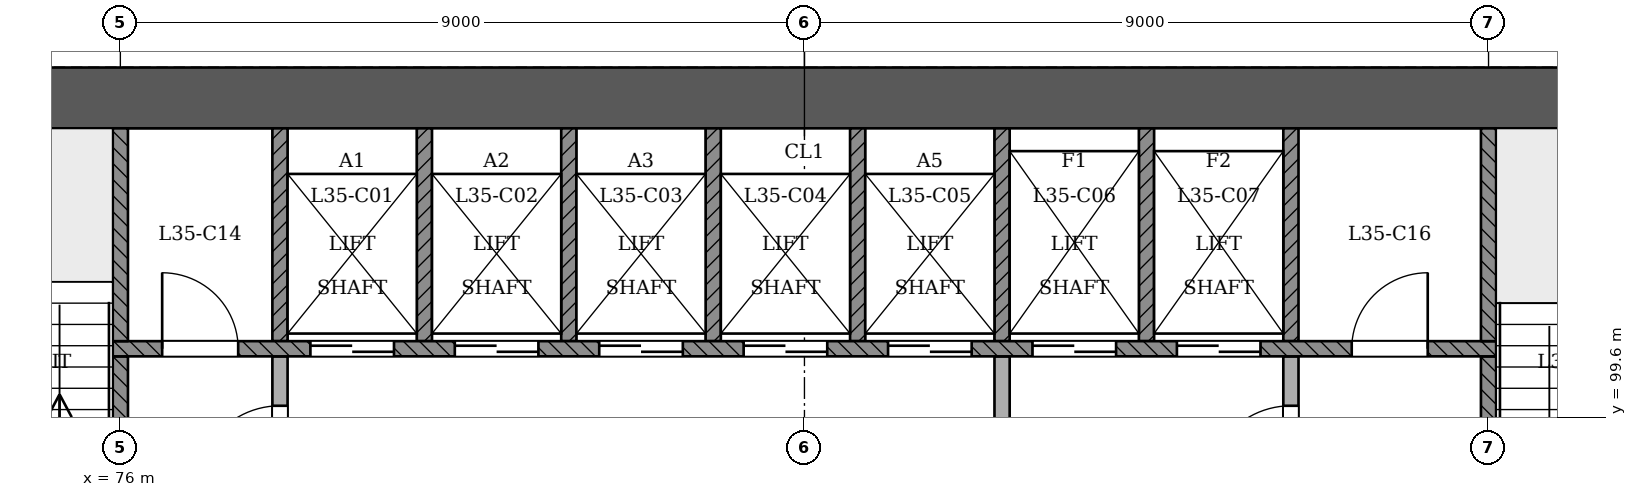
"""IFC4 building model, lengths in metres.
Left out: names, types, materials, properties, quantities, classifications, styles, units other than length and angle.
Written with IfcOpenShell. Run it as: python <this file> out.ifc"""

import sys

from ifc_helpers import new_model, si_unit, direction, frame, frame_2d, origin, place, context, subcontext, project, spatial, rectangle, extrude, element, fill, save


model = new_model("IFC4")
c1 = context("Model", 3, precision=1e-05, world=origin(), true_north=direction((0.0, 1.0)))
c2 = subcontext(c1, "Body", "Model", "MODEL_VIEW")
j1 = project(units=[si_unit("LENGTHUNIT", "METRE"), si_unit("PLANEANGLEUNIT", "RADIAN")], contexts=[c1])
p1 = place(None, origin())
s1 = spatial("IfcSite", under=j1, at=p1, CompositionType="ELEMENT")
p2 = place(p1, origin())
s2 = spatial("IfcBuilding", under=s1, at=p2, CompositionType="ELEMENT")
p3 = place(p2, frame((0.0, 0.0, 138.6)))
s3 = spatial("IfcBuildingStorey", under=s2, at=p3, CompositionType="ELEMENT", Elevation=138.6)
p4 = place(p3, frame((97.4, 103.8, 0.0), z_axis=(0.0, 0.0, 1.0), x_axis=(-1.0, 0.0, 0.0)))
e1 = element("IfcWall", 1, at=p4, inside=s3, PredefinedType="SHEAR", context=c2, shape_type="SweptSolid", body=[
    extrude(rectangle(XDim=25.2, YDim=0.8, at=frame_2d((12.6, 0.0))), origin(), (0.0, 0.0, 1.0), 3.6),
])
p5 = place(p3, frame((87.6, 93.4, 0.0), z_axis=(0.0, 0.0, 1.0), x_axis=(0.0, 1.0, 0.0)))
e2 = element("IfcWall", 2, at=p5, inside=s3, PredefinedType="PARTITIONING", context=c2, shape_type="SweptSolid", body=[
    extrude(rectangle(XDim=7.0, YDim=0.2, at=frame_2d((3.5, 0.0))), origin(), (0.0, 0.0, 1.0), 3.15),
])
p6 = place(p5, frame((4.45, 0.0, 0.0)))
e3 = element("IfcOpeningElement", 3, at=p6, cuts=e2, PredefinedType="OPENING", context=c2, shape_type="SweptSolid", body=[
    extrude(rectangle(XDim=1.1, YDim=2.1, at=frame_2d((0.55, 1.05))), frame((0.0, 0.11, 0.0), z_axis=(0.0, -1.0, 0.0), x_axis=(1.0, 0.0, 0.0)), (0.0, 0.0, 1.0), 0.221),
])
p7 = place(p3, frame((91.4, 96.2, 0.0), z_axis=(0.0, 0.0, 1.0), x_axis=(0.0, 1.0, 0.0)))
e4 = element("IfcWall", 4, at=p7, inside=s3, PredefinedType="PARTITIONING", context=c2, shape_type="SweptSolid", body=[
    extrude(rectangle(XDim=4.2, YDim=0.2, at=frame_2d((2.1, 0.0))), origin(), (0.0, 0.0, 1.0), 3.15),
])
p8 = place(p7, frame((2.45, 0.0, 0.0)))
e5 = element("IfcOpeningElement", 5, at=p8, cuts=e4, PredefinedType="OPENING", context=c2, shape_type="SweptSolid", body=[
    extrude(rectangle(XDim=1.1, YDim=2.1, at=frame_2d((0.55, 1.05))), frame((0.0, 0.11, 0.0), z_axis=(0.0, -1.0, 0.0), x_axis=(1.0, 0.0, 0.0)), (0.0, 0.0, 1.0), 0.221),
])
p9 = place(p3, frame((76.0, 96.7, 0.0), z_axis=(0.0, 0.0, 1.0), x_axis=(0.0, 1.0, 0.0)))
e6 = element("IfcWall", 6, at=p9, inside=s3, PredefinedType="SOLIDWALL", context=c2, shape_type="SweptSolid", body=[
    extrude(rectangle(XDim=3.7, YDim=0.2, at=frame_2d((1.85, 0.0))), origin(), (0.0, 0.0, 1.0), 3.15),
])
p10 = place(p9, frame((0.35, 0.0, 0.0)))
e7 = element("IfcOpeningElement", 7, at=p10, cuts=e6, PredefinedType="OPENING", context=c2, shape_type="SweptSolid", body=[
    extrude(rectangle(XDim=1.1, YDim=2.1, at=frame_2d((0.55, 1.05))), frame((0.0, 0.11, 0.0), z_axis=(0.0, -1.0, 0.0), x_axis=(1.0, 0.0, 0.0)), (0.0, 0.0, 1.0), 0.221),
])
p11 = place(p3, frame((78.1, 96.7, 0.0), z_axis=(0.0, 0.0, 1.0), x_axis=(0.0, 1.0, 0.0)))
e8 = element("IfcWall", 8, at=p11, inside=s3, PredefinedType="PARTITIONING", context=c2, shape_type="SweptSolid", body=[
    extrude(rectangle(XDim=3.7, YDim=0.2, at=frame_2d((1.85, 0.0))), origin(), (0.0, 0.0, 1.0), 3.15),
])
p12 = place(p11, frame((1.95, 0.0, 0.0)))
e9 = element("IfcOpeningElement", 9, at=p12, cuts=e8, PredefinedType="OPENING", context=c2, shape_type="SweptSolid", body=[
    extrude(rectangle(XDim=1.1, YDim=2.1, at=frame_2d((0.55, 1.05))), frame((0.0, 0.11, 0.0), z_axis=(0.0, -1.0, 0.0), x_axis=(1.0, 0.0, 0.0)), (0.0, 0.0, 1.0), 0.221),
])
p13 = place(p3, frame((94.0, 96.7, 0.0), z_axis=(0.0, 0.0, 1.0), x_axis=(0.0, 1.0, 0.0)))
e10 = element("IfcWall", 10, at=p13, inside=s3, PredefinedType="SOLIDWALL", context=c2, shape_type="SweptSolid", body=[
    extrude(rectangle(XDim=3.7, YDim=0.2, at=frame_2d((1.85, 0.0))), origin(), (0.0, 0.0, 1.0), 3.15),
])
p14 = place(p13, frame((0.35, 0.0, 0.0)))
e11 = element("IfcOpeningElement", 11, at=p14, cuts=e10, PredefinedType="OPENING", context=c2, shape_type="SweptSolid", body=[
    extrude(rectangle(XDim=1.1, YDim=2.1, at=frame_2d((0.55, 1.05))), frame((0.0, 0.11, 0.0), z_axis=(0.0, -1.0, 0.0), x_axis=(1.0, 0.0, 0.0)), (0.0, 0.0, 1.0), 0.221),
])
p15 = place(p3, frame((75.9, 100.5, 0.0), z_axis=(0.0, 0.0, 1.0), x_axis=(1.0, 0.0, 0.0)))
e12 = element("IfcWall", 12, at=p15, inside=s3, PredefinedType="SOLIDWALL", context=c2, shape_type="SweptSolid", body=[
    extrude(rectangle(XDim=18.2, YDim=0.2, at=frame_2d((9.1, 0.0))), origin(), (0.0, 0.0, 1.0), 3.15),
])
p16 = place(p15, frame((2.6, 0.0, 0.0)))
e13 = element("IfcOpeningElement", 13, at=p16, cuts=e12, PredefinedType="OPENING", context=c2, shape_type="SweptSolid", body=[
    extrude(rectangle(XDim=1.1, YDim=2.1, at=frame_2d((0.55, 1.05))), frame((0.0, 0.11, 0.0), z_axis=(0.0, -1.0, 0.0), x_axis=(1.0, 0.0, 0.0)), (0.0, 0.0, 1.0), 0.221),
])
p17 = place(p15, frame((4.5, 0.0, 0.0)))
e14 = element("IfcOpeningElement", 14, at=p17, cuts=e12, PredefinedType="OPENING", context=c2, shape_type="SweptSolid", body=[
    extrude(rectangle(XDim=1.1, YDim=2.1, at=frame_2d((0.55, 1.05))), frame((0.0, 0.11, 0.0), z_axis=(0.0, -1.0, 0.0), x_axis=(1.0, 0.0, 0.0)), (0.0, 0.0, 1.0), 0.221),
])
p18 = place(p15, frame((6.4, 0.0, 0.0)))
e15 = element("IfcOpeningElement", 15, at=p18, cuts=e12, PredefinedType="OPENING", context=c2, shape_type="SweptSolid", body=[
    extrude(rectangle(XDim=1.1, YDim=2.1, at=frame_2d((0.55, 1.05))), frame((0.0, 0.11, 0.0), z_axis=(0.0, -1.0, 0.0), x_axis=(1.0, 0.0, 0.0)), (0.0, 0.0, 1.0), 0.221),
])
p19 = place(p15, frame((8.3, 0.0, 0.0)))
e16 = element("IfcOpeningElement", 16, at=p19, cuts=e12, PredefinedType="OPENING", context=c2, shape_type="SweptSolid", body=[
    extrude(rectangle(XDim=1.1, YDim=2.1, at=frame_2d((0.55, 1.05))), frame((0.0, 0.11, 0.0), z_axis=(0.0, -1.0, 0.0), x_axis=(1.0, 0.0, 0.0)), (0.0, 0.0, 1.0), 0.221),
])
p20 = place(p15, frame((10.2, 0.0, 0.0)))
e17 = element("IfcOpeningElement", 17, at=p20, cuts=e12, PredefinedType="OPENING", context=c2, shape_type="SweptSolid", body=[
    extrude(rectangle(XDim=1.1, YDim=2.1, at=frame_2d((0.55, 1.05))), frame((0.0, 0.11, 0.0), z_axis=(0.0, -1.0, 0.0), x_axis=(1.0, 0.0, 0.0)), (0.0, 0.0, 1.0), 0.221),
])
p21 = place(p15, frame((12.1, 0.0, 0.0)))
e18 = element("IfcOpeningElement", 18, at=p21, cuts=e12, PredefinedType="OPENING", context=c2, shape_type="SweptSolid", body=[
    extrude(rectangle(XDim=1.1, YDim=2.1, at=frame_2d((0.55, 1.05))), frame((0.0, 0.11, 0.0), z_axis=(0.0, -1.0, 0.0), x_axis=(1.0, 0.0, 0.0)), (0.0, 0.0, 1.0), 0.221),
])
p22 = place(p15, frame((14.0, 0.0, 0.0)))
e19 = element("IfcOpeningElement", 19, at=p22, cuts=e12, PredefinedType="OPENING", context=c2, shape_type="SweptSolid", body=[
    extrude(rectangle(XDim=1.1, YDim=2.1, at=frame_2d((0.55, 1.05))), frame((0.0, 0.11, 0.0), z_axis=(0.0, -1.0, 0.0), x_axis=(1.0, 0.0, 0.0)), (0.0, 0.0, 1.0), 0.221),
])
p23 = place(p15, frame((0.65, 0.0, 0.0)))
e20 = element("IfcOpeningElement", 20, at=p23, cuts=e12, PredefinedType="OPENING", context=c2, shape_type="SweptSolid", body=[
    extrude(rectangle(XDim=1.0, YDim=2.1, at=frame_2d((0.5, 1.05))), frame((0.0, 0.11, 0.0), z_axis=(0.0, -1.0, 0.0), x_axis=(1.0, 0.0, 0.0)), (0.0, 0.0, 1.0), 0.221),
])
p24 = place(p15, frame((16.3, 0.0, 0.0)))
e21 = element("IfcOpeningElement", 21, at=p24, cuts=e12, PredefinedType="OPENING", context=c2, shape_type="SweptSolid", body=[
    extrude(rectangle(XDim=1.0, YDim=2.1, at=frame_2d((0.5, 1.05))), frame((0.0, 0.11, 0.0), z_axis=(0.0, -1.0, 0.0), x_axis=(1.0, 0.0, 0.0)), (0.0, 0.0, 1.0), 0.221),
])
for number, where, z_axis, x_axis in (
    (22, (76.0, 100.6, 0.0), (0.0, 0.0, 1.0), (0.0, 1.0, 0.0)),
    (23, (78.1, 100.6, 0.0), (0.0, 0.0, 1.0), (0.0, 1.0, 0.0)),
    (24, (80.0, 100.6, 0.0), (0.0, 0.0, 1.0), (0.0, 1.0, 0.0)),
    (25, (81.9, 100.6, 0.0), (0.0, 0.0, 1.0), (0.0, 1.0, 0.0)),
    (26, (83.8, 100.6, 0.0), (0.0, 0.0, 1.0), (0.0, 1.0, 0.0)),
    (27, (85.7, 100.6, 0.0), (0.0, 0.0, 1.0), (0.0, 1.0, 0.0)),
    (28, (87.6, 100.6, 0.0), (0.0, 0.0, 1.0), (0.0, 1.0, 0.0)),
    (29, (89.5, 100.6, 0.0), (0.0, 0.0, 1.0), (0.0, 1.0, 0.0)),
    (30, (91.4, 100.6, 0.0), (0.0, 0.0, 1.0), (0.0, 1.0, 0.0)),
    (31, (94.0, 100.6, 0.0), (0.0, 0.0, 1.0), (0.0, 1.0, 0.0)),
):
    element("IfcWall", number, at=place(p3, frame(where, z_axis=z_axis, x_axis=x_axis)), inside=s3, PredefinedType="SOLIDWALL", context=c2, shape_type="SweptSolid", body=[
        extrude(rectangle(XDim=2.8, YDim=0.2, at=frame_2d((1.4, 0.0))), origin(), (0.0, 0.0, 1.0), 3.15),
    ])
p25 = place(p16, origin())
e32 = element("IfcDoor", 32, at=p25, inside=s3, OperationType="SLIDING_TO_RIGHT", PredefinedType="NOTDEFINED", context=c2, shape_type="SweptSolid", body=[
    extrude(rectangle(XDim=1.1, YDim=2.1, at=frame_2d((0.55, 1.05))), frame((0.0, 0.025, 0.0), z_axis=(0.0, -1.0, 0.0), x_axis=(1.0, 0.0, 0.0)), (0.0, 0.0, 1.0), 0.05),
])
fill(e13, e32)
p26 = place(p17, origin())
e33 = element("IfcDoor", 33, at=p26, inside=s3, OperationType="SLIDING_TO_LEFT", PredefinedType="NOTDEFINED", context=c2, shape_type="SweptSolid", body=[
    extrude(rectangle(XDim=1.1, YDim=2.1, at=frame_2d((0.55, 1.05))), frame((0.0, 0.025, 0.0), z_axis=(0.0, -1.0, 0.0), x_axis=(1.0, 0.0, 0.0)), (0.0, 0.0, 1.0), 0.05),
])
fill(e14, e33)
p27 = place(p18, origin())
e34 = element("IfcDoor", 34, at=p27, inside=s3, OperationType="SLIDING_TO_RIGHT", PredefinedType="NOTDEFINED", context=c2, shape_type="SweptSolid", body=[
    extrude(rectangle(XDim=1.1, YDim=2.1, at=frame_2d((0.55, 1.05))), frame((0.0, 0.025, 0.0), z_axis=(0.0, -1.0, 0.0), x_axis=(1.0, 0.0, 0.0)), (0.0, 0.0, 1.0), 0.05),
])
fill(e15, e34)
p28 = place(p19, origin())
e35 = element("IfcDoor", 35, at=p28, inside=s3, OperationType="SLIDING_TO_LEFT", PredefinedType="NOTDEFINED", context=c2, shape_type="SweptSolid", body=[
    extrude(rectangle(XDim=1.1, YDim=2.1, at=frame_2d((0.55, 1.05))), frame((0.0, 0.025, 0.0), z_axis=(0.0, -1.0, 0.0), x_axis=(1.0, 0.0, 0.0)), (0.0, 0.0, 1.0), 0.05),
])
fill(e16, e35)
p29 = place(p20, origin())
e36 = element("IfcDoor", 36, at=p29, inside=s3, OperationType="SLIDING_TO_RIGHT", PredefinedType="NOTDEFINED", context=c2, shape_type="SweptSolid", body=[
    extrude(rectangle(XDim=1.1, YDim=2.1, at=frame_2d((0.55, 1.05))), frame((0.0, 0.025, 0.0), z_axis=(0.0, -1.0, 0.0), x_axis=(1.0, 0.0, 0.0)), (0.0, 0.0, 1.0), 0.05),
])
fill(e17, e36)
p30 = place(p21, origin())
e37 = element("IfcDoor", 37, at=p30, inside=s3, OperationType="SLIDING_TO_RIGHT", PredefinedType="NOTDEFINED", context=c2, shape_type="SweptSolid", body=[
    extrude(rectangle(XDim=1.1, YDim=2.1, at=frame_2d((0.55, 1.05))), frame((0.0, 0.025, 0.0), z_axis=(0.0, -1.0, 0.0), x_axis=(1.0, 0.0, 0.0)), (0.0, 0.0, 1.0), 0.05),
])
fill(e18, e37)
p31 = place(p22, origin())
e38 = element("IfcDoor", 38, at=p31, inside=s3, OperationType="SLIDING_TO_LEFT", PredefinedType="NOTDEFINED", context=c2, shape_type="SweptSolid", body=[
    extrude(rectangle(XDim=1.1, YDim=2.1, at=frame_2d((0.55, 1.05))), frame((0.0, 0.025, 0.0), z_axis=(0.0, -1.0, 0.0), x_axis=(1.0, 0.0, 0.0)), (0.0, 0.0, 1.0), 0.05),
])
fill(e19, e38)
p32 = place(p12, origin())
e39 = element("IfcDoor", 39, at=p32, inside=s3, OperationType="SINGLE_SWING_LEFT", PredefinedType="NOTDEFINED", context=c2, shape_type="SweptSolid", body=[
    extrude(rectangle(XDim=1.1, YDim=2.1, at=frame_2d((0.55, 1.05))), frame((0.0, 0.025, 0.0), z_axis=(0.0, -1.0, 0.0), x_axis=(1.0, 0.0, 0.0)), (0.0, 0.0, 1.0), 0.05),
])
fill(e9, e39)
p33 = place(p8, origin())
e40 = element("IfcDoor", 40, at=p33, inside=s3, OperationType="SINGLE_SWING_LEFT", PredefinedType="NOTDEFINED", context=c2, shape_type="SweptSolid", body=[
    extrude(rectangle(XDim=1.1, YDim=2.1, at=frame_2d((0.55, 1.05))), frame((0.0, 0.025, 0.0), z_axis=(0.0, -1.0, 0.0), x_axis=(1.0, 0.0, 0.0)), (0.0, 0.0, 1.0), 0.05),
])
fill(e5, e40)
p34 = place(p23, origin())
e41 = element("IfcDoor", 41, at=p34, inside=s3, OperationType="SINGLE_SWING_LEFT", PredefinedType="NOTDEFINED", context=c2, shape_type="SweptSolid", body=[
    extrude(rectangle(XDim=1.0, YDim=2.1, at=frame_2d((0.5, 1.05))), frame((0.0, 0.025, 0.0), z_axis=(0.0, -1.0, 0.0), x_axis=(1.0, 0.0, 0.0)), (0.0, 0.0, 1.0), 0.05),
])
fill(e20, e41)
p35 = place(p24, origin())
e42 = element("IfcDoor", 42, at=p35, inside=s3, OperationType="SINGLE_SWING_RIGHT", PredefinedType="NOTDEFINED", context=c2, shape_type="SweptSolid", body=[
    extrude(rectangle(XDim=1.0, YDim=2.1, at=frame_2d((0.5, 1.05))), frame((0.0, 0.025, 0.0), z_axis=(0.0, -1.0, 0.0), x_axis=(1.0, 0.0, 0.0)), (0.0, 0.0, 1.0), 0.05),
])
fill(e21, e42)
save(model, sys.argv[1])
